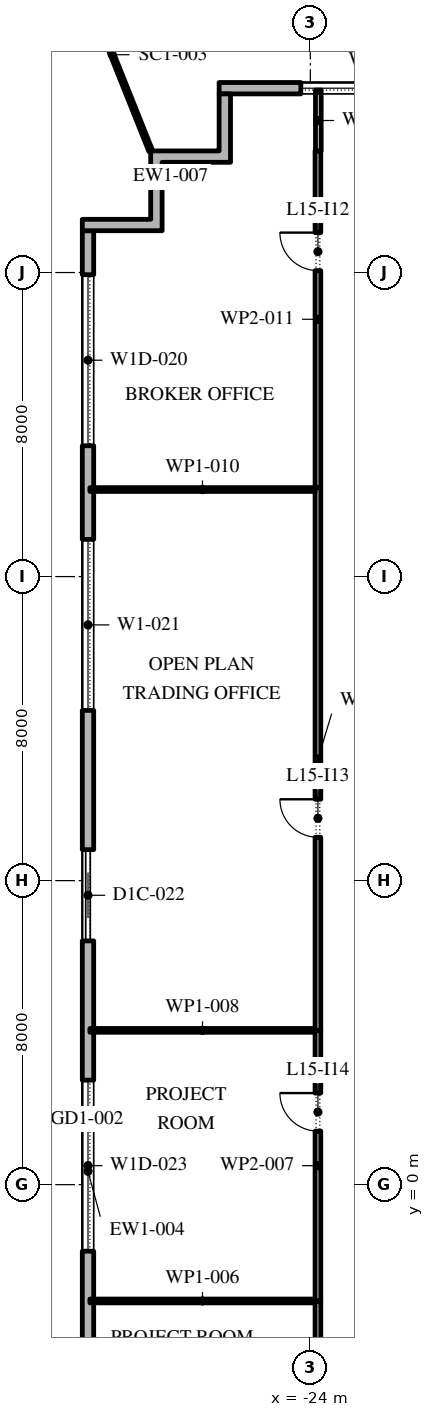
"""IFC4 building model, lengths in metres.
Left out: names, types, materials, properties, quantities, classifications, styles, units other than length and angle.
Written with IfcOpenShell. Run it as: python <this file> out.ifc"""

import sys

from ifc_helpers import new_model, si_unit, direction, frame, frame_2d, origin, place, context, subcontext, project, spatial, polyline, rectangle, outline, extrude, element, fill, save


model = new_model("IFC4")
c1 = context("Model", 3, precision=1e-05, world=origin(), true_north=direction((0.0, 1.0)))
c2 = subcontext(c1, "Body", "Model", "MODEL_VIEW")
j1 = project(units=[si_unit("LENGTHUNIT", "METRE"), si_unit("PLANEANGLEUNIT", "RADIAN")], contexts=[c1])
p1 = place(None, origin())
s1 = spatial("IfcSite", under=j1, at=p1, CompositionType="ELEMENT")
p2 = place(p1, origin())
s2 = spatial("IfcBuilding", under=s1, at=p2, CompositionType="ELEMENT")
p3 = place(p2, frame((0.0, 0.0, 73.2)))
s3 = spatial("IfcBuildingStorey", under=s2, at=p3, CompositionType="ELEMENT", Elevation=73.2)
p4 = place(p3, frame((26.1, 28.85, 0.0), z_axis=(0.0, 0.0, 1.0), x_axis=(-1.0, 0.0, 0.0)))
e1 = element("IfcWall", 1, at=p4, inside=s3, PredefinedType="STANDARD", context=c2, shape_type="SweptSolid", body=[
    extrude(rectangle(XDim=52.5, YDim=0.3, at=frame_2d((26.25, 0.0))), origin(), (0.0, 0.0, 1.0), 4.0),
])
p5 = place(p4, frame((2.0, 0.0, 0.45)))
e2 = element("IfcOpeningElement", 2, at=p5, cuts=e1, PredefinedType="OPENING", context=c2, shape_type="SweptSolid", body=[
    extrude(rectangle(XDim=4.5, YDim=2.95, at=frame_2d((2.25, 1.475))), frame((0.0, 0.16, 0.0), z_axis=(0.0, -1.0, 0.0), x_axis=(1.0, 0.0, 0.0)), (0.0, 0.0, 1.0), 0.32),
])
p6 = place(p4, frame((10.65, 0.0, 0.45)))
e3 = element("IfcOpeningElement", 3, at=p6, cuts=e1, PredefinedType="OPENING", context=c2, shape_type="SweptSolid", body=[
    extrude(rectangle(XDim=4.5, YDim=2.95, at=frame_2d((2.25, 1.475))), frame((0.0, 0.16, 0.0), z_axis=(0.0, -1.0, 0.0), x_axis=(1.0, 0.0, 0.0)), (0.0, 0.0, 1.0), 0.32),
])
p7 = place(p4, frame((20.5, 0.0, 0.0)))
e4 = element("IfcOpeningElement", 4, at=p7, cuts=e1, PredefinedType="OPENING", context=c2, shape_type="SweptSolid", body=[
    extrude(rectangle(XDim=2.4, YDim=3.5, at=frame_2d((1.2, 1.75))), frame((0.0, 0.16, 0.0), z_axis=(0.0, -1.0, 0.0), x_axis=(1.0, 0.0, 0.0)), (0.0, 0.0, 1.0), 0.32),
])
p8 = place(p4, frame((28.25, 0.0, 0.45)))
e5 = element("IfcOpeningElement", 5, at=p8, cuts=e1, PredefinedType="OPENING", context=c2, shape_type="SweptSolid", body=[
    extrude(rectangle(XDim=4.5, YDim=2.95, at=frame_2d((2.25, 1.475))), frame((0.0, 0.16, 0.0), z_axis=(0.0, -1.0, 0.0), x_axis=(1.0, 0.0, 0.0)), (0.0, 0.0, 1.0), 0.32),
])
p9 = place(p4, frame((37.05, 0.0, 0.45)))
e6 = element("IfcOpeningElement", 6, at=p9, cuts=e1, PredefinedType="OPENING", context=c2, shape_type="SweptSolid", body=[
    extrude(rectangle(XDim=4.5, YDim=2.95, at=frame_2d((2.25, 1.475))), frame((0.0, 0.16, 0.0), z_axis=(0.0, -1.0, 0.0), x_axis=(1.0, 0.0, 0.0)), (0.0, 0.0, 1.0), 0.32),
])
p10 = place(p4, frame((45.85, 0.0, 0.45)))
e7 = element("IfcOpeningElement", 7, at=p10, cuts=e1, PredefinedType="OPENING", context=c2, shape_type="SweptSolid", body=[
    extrude(rectangle(XDim=4.5, YDim=2.95, at=frame_2d((2.25, 1.475))), frame((0.0, 0.16, 0.0), z_axis=(0.0, -1.0, 0.0), x_axis=(1.0, 0.0, 0.0)), (0.0, 0.0, 1.0), 0.32),
])
p11 = place(p3, frame((-29.85, 25.1, 0.0), z_axis=(0.0, 0.0, 1.0), x_axis=(0.0, -1.0, 0.0)))
e8 = element("IfcWall", 8, at=p11, inside=s3, PredefinedType="STANDARD", context=c2, shape_type="SweptSolid", body=[
    extrude(rectangle(XDim=49.5, YDim=0.3, at=frame_2d((24.75, 0.0))), origin(), (0.0, 0.0, 1.0), 4.0),
])
p12 = place(p11, frame((1.157, 0.0, 0.45)))
e9 = element("IfcOpeningElement", 9, at=p12, cuts=e8, PredefinedType="OPENING", context=c2, shape_type="SweptSolid", body=[
    extrude(rectangle(XDim=4.5, YDim=2.875, at=frame_2d((2.25, 1.438))), frame((0.0, 0.16, 0.0), z_axis=(0.0, -1.0, 0.0), x_axis=(1.0, 0.0, 0.0)), (0.0, 0.0, 1.0), 0.32),
])
p13 = place(p11, frame((8.121, 0.0, 0.45)))
e10 = element("IfcOpeningElement", 10, at=p13, cuts=e8, PredefinedType="OPENING", context=c2, shape_type="SweptSolid", body=[
    extrude(rectangle(XDim=4.5, YDim=3.05, at=frame_2d((2.25, 1.525))), frame((0.0, 0.16, 0.0), z_axis=(0.0, -1.0, 0.0), x_axis=(1.0, 0.0, 0.0)), (0.0, 0.0, 1.0), 0.32),
])
p14 = place(p11, frame((16.286, 0.0, 0.0)))
e11 = element("IfcOpeningElement", 11, at=p14, cuts=e8, PredefinedType="OPENING", context=c2, shape_type="SweptSolid", body=[
    extrude(rectangle(XDim=2.4, YDim=3.325, at=frame_2d((1.2, 1.663))), frame((0.0, 0.16, 0.0), z_axis=(0.0, -1.0, 0.0), x_axis=(1.0, 0.0, 0.0)), (0.0, 0.0, 1.0), 0.32),
])
p15 = place(p11, frame((22.35, 0.0, 0.45)))
e12 = element("IfcOpeningElement", 12, at=p15, cuts=e8, PredefinedType="OPENING", context=c2, shape_type="SweptSolid", body=[
    extrude(rectangle(XDim=4.5, YDim=2.875, at=frame_2d((2.25, 1.438))), frame((0.0, 0.16, 0.0), z_axis=(0.0, -1.0, 0.0), x_axis=(1.0, 0.0, 0.0)), (0.0, 0.0, 1.0), 0.32),
])
p16 = place(p11, frame((29.464, 0.0, 0.45)))
e13 = element("IfcOpeningElement", 13, at=p16, cuts=e8, PredefinedType="OPENING", context=c2, shape_type="SweptSolid", body=[
    extrude(rectangle(XDim=4.5, YDim=2.875, at=frame_2d((2.25, 1.438))), frame((0.0, 0.16, 0.0), z_axis=(0.0, -1.0, 0.0), x_axis=(1.0, 0.0, 0.0)), (0.0, 0.0, 1.0), 0.32),
])
p17 = place(p11, frame((36.579, 0.0, 0.45)))
e14 = element("IfcOpeningElement", 14, at=p17, cuts=e8, PredefinedType="OPENING", context=c2, shape_type="SweptSolid", body=[
    extrude(rectangle(XDim=4.5, YDim=2.825, at=frame_2d((2.25, 1.413))), frame((0.0, 0.16, 0.0), z_axis=(0.0, -1.0, 0.0), x_axis=(1.0, 0.0, 0.0)), (0.0, 0.0, 1.0), 0.32),
])
p18 = place(p11, frame((44.743, 0.0, 0.0)))
e15 = element("IfcOpeningElement", 15, at=p18, cuts=e8, PredefinedType="OPENING", context=c2, shape_type="SweptSolid", body=[
    extrude(rectangle(XDim=2.4, YDim=3.5, at=frame_2d((1.2, 1.75))), frame((0.0, 0.16, 0.0), z_axis=(0.0, -1.0, 0.0), x_axis=(1.0, 0.0, 0.0)), (0.0, 0.0, 1.0), 0.32),
])
p19 = place(p3, origin())
e16 = element("IfcWall", 16, at=p19, inside=s3, PredefinedType="STANDARD", context=c2, shape_type="SweptSolid", body=[
    extrude(outline(polyline([(-28.2, 25.4), (-28.2, 27.2), (-26.4, 27.2), (-26.4, 28.7), (-26.1, 28.7), (-26.1, 26.9), (-27.9, 26.9), (-27.9, 25.1), (-30.0, 25.1), (-30.0, 25.4), (-28.2, 25.4)])), origin(), (0.0, 0.0, 1.0), 4.0),
])
p20 = place(p3, frame((-28.2, 27.2, -0.05), z_axis=(0.0, 0.0, 1.0), x_axis=(-0.371390676354, 0.928476690885, 0.0)))
e17 = element("IfcWall", 17, at=p20, inside=s3, PredefinedType="STANDARD", context=c2, shape_type="SweptSolid", body=[
    extrude(rectangle(XDim=5.452, YDim=0.1, at=frame_2d((2.726, 0.0))), origin(), (0.0, 0.0, 1.0), 4.05),
])
p21 = place(p3, frame((-23.8, -10.12, 0.0), z_axis=(0.0, 0.0, 1.0), x_axis=(0.0, 1.0, 0.0)))
e18 = element("IfcWall", 18, at=p21, inside=s3, PredefinedType="PARTITIONING", context=c2, shape_type="SweptSolid", body=[
    extrude(rectangle(XDim=7.06, YDim=0.15, at=frame_2d((3.53, 0.0))), origin(), (0.0, 0.0, 1.0), 4.0),
])
p22 = place(p21, frame((1.66, 0.0, 0.0)))
e19 = element("IfcOpeningElement", 19, at=p22, cuts=e18, PredefinedType="OPENING", context=c2, shape_type="SweptSolid", body=[
    extrude(rectangle(XDim=1.0, YDim=2.1, at=frame_2d((0.5, 1.05))), frame((0.0, 0.085, 0.0), z_axis=(0.0, -1.0, 0.0), x_axis=(1.0, 0.0, 0.0)), (0.0, 0.0, 1.0), 0.17),
])
p23 = place(p3, frame((-23.875, -3.06, 0.0), z_axis=(0.0, 0.0, 1.0), x_axis=(-1.0, 0.0, 0.0)))
e20 = element("IfcWall", 20, at=p23, inside=s3, PredefinedType="PARTITIONING", context=c2, shape_type="SweptSolid", body=[
    extrude(rectangle(XDim=5.925, YDim=0.1, at=frame_2d((2.962, 0.0))), origin(), (0.0, 0.0, 1.0), 4.0),
])
p24 = place(p3, frame((-23.8, -3.06, 0.0), z_axis=(0.0, 0.0, 1.0), x_axis=(0.0, 1.0, 0.0)))
e21 = element("IfcWall", 21, at=p24, inside=s3, PredefinedType="PARTITIONING", context=c2, shape_type="SweptSolid", body=[
    extrude(rectangle(XDim=7.12, YDim=0.15, at=frame_2d((3.56, 0.0))), origin(), (0.0, 0.0, 1.0), 4.0),
])
p25 = place(p24, frame((4.47, 0.0, 0.0)))
e22 = element("IfcOpeningElement", 22, at=p25, cuts=e21, PredefinedType="OPENING", context=c2, shape_type="SweptSolid", body=[
    extrude(rectangle(XDim=1.0, YDim=2.1, at=frame_2d((0.5, 1.05))), frame((0.0, 0.085, 0.0), z_axis=(0.0, -1.0, 0.0), x_axis=(1.0, 0.0, 0.0)), (0.0, 0.0, 1.0), 0.17),
])
p26 = place(p3, frame((-23.875, 4.06, 0.0), z_axis=(0.0, 0.0, 1.0), x_axis=(-1.0, 0.0, 0.0)))
e23 = element("IfcWall", 23, at=p26, inside=s3, PredefinedType="PARTITIONING", context=c2, shape_type="SweptSolid", body=[
    extrude(rectangle(XDim=5.925, YDim=0.1, at=frame_2d((2.962, 0.0))), origin(), (0.0, 0.0, 1.0), 4.0),
])
p27 = place(p3, frame((-23.8, 4.06, 0.0), z_axis=(0.0, 0.0, 1.0), x_axis=(0.0, 1.0, 0.0)))
e24 = element("IfcWall", 24, at=p27, inside=s3, PredefinedType="PARTITIONING", context=c2, shape_type="SweptSolid", body=[
    extrude(rectangle(XDim=14.28, YDim=0.15, at=frame_2d((7.14, 0.0))), origin(), (0.0, 0.0, 1.0), 4.0),
])
p28 = place(p27, frame((5.08, 0.0, 0.0)))
e25 = element("IfcOpeningElement", 25, at=p28, cuts=e24, PredefinedType="OPENING", context=c2, shape_type="SweptSolid", body=[
    extrude(rectangle(XDim=1.0, YDim=2.1, at=frame_2d((0.5, 1.05))), frame((0.0, 0.085, 0.0), z_axis=(0.0, -1.0, 0.0), x_axis=(1.0, 0.0, 0.0)), (0.0, 0.0, 1.0), 0.17),
])
p29 = place(p3, frame((-23.875, 18.29, 0.0), z_axis=(0.0, 0.0, 1.0), x_axis=(-1.0, 0.0, 0.0)))
e26 = element("IfcWall", 26, at=p29, inside=s3, PredefinedType="PARTITIONING", context=c2, shape_type="SweptSolid", body=[
    extrude(rectangle(XDim=5.925, YDim=0.1, at=frame_2d((2.962, 0.0))), origin(), (0.0, 0.0, 1.0), 4.0),
])
p30 = place(p3, frame((-23.8, 18.34, 0.0), z_axis=(0.0, 0.0, 1.0), x_axis=(0.0, 1.0, 0.0)))
e27 = element("IfcWall", 27, at=p30, inside=s3, PredefinedType="PARTITIONING", context=c2, shape_type="SweptSolid", body=[
    extrude(rectangle(XDim=8.86, YDim=0.15, at=frame_2d((4.43, 0.0))), origin(), (0.0, 0.0, 1.0), 4.0),
])
p31 = place(p30, frame((5.71, 0.0, 0.0)))
e28 = element("IfcOpeningElement", 28, at=p31, cuts=e27, PredefinedType="OPENING", context=c2, shape_type="SweptSolid", body=[
    extrude(rectangle(XDim=1.0, YDim=2.1, at=frame_2d((0.5, 1.05))), frame((0.0, 0.085, 0.0), z_axis=(0.0, -1.0, 0.0), x_axis=(1.0, 0.0, 0.0)), (0.0, 0.0, 1.0), 0.17),
])
p32 = place(p3, frame((-23.79, 27.2, 0.0), z_axis=(0.0, 0.0, 1.0), x_axis=(0.0, 1.0, 0.0)))
e29 = element("IfcWall", 29, at=p32, inside=s3, PredefinedType="PARTITIONING", context=c2, shape_type="SweptSolid", body=[
    extrude(rectangle(XDim=1.6, YDim=0.15, at=frame_2d((0.8, 0.0))), origin(), (0.0, 0.0, 1.0), 4.0),
])
p33 = place(p10, origin())
e30 = element("IfcWindow", 30, at=p33, inside=s3, PartitioningType="DOUBLE_PANEL_VERTICAL", PredefinedType="WINDOW", context=c2, shape_type="SweptSolid", body=[
    extrude(rectangle(XDim=4.5, YDim=2.95, at=frame_2d((2.25, 1.475))), frame((0.0, 0.03, 0.0), z_axis=(0.0, -1.0, 0.0), x_axis=(1.0, 0.0, 0.0)), (0.0, 0.0, 1.0), 0.06),
])
fill(e7, e30)
p34 = place(p12, origin())
e31 = element("IfcWindow", 31, at=p34, inside=s3, PartitioningType="DOUBLE_PANEL_VERTICAL", PredefinedType="WINDOW", context=c2, shape_type="SweptSolid", body=[
    extrude(rectangle(XDim=4.5, YDim=2.875, at=frame_2d((2.25, 1.438))), frame((0.0, 0.03, 0.0), z_axis=(0.0, -1.0, 0.0), x_axis=(1.0, 0.0, 0.0)), (0.0, 0.0, 1.0), 0.06),
])
fill(e9, e31)
p35 = place(p13, origin())
e32 = element("IfcWindow", 32, at=p35, inside=s3, PartitioningType="DOUBLE_PANEL_VERTICAL", PredefinedType="WINDOW", context=c2, shape_type="SweptSolid", body=[
    extrude(rectangle(XDim=4.5, YDim=3.05, at=frame_2d((2.25, 1.525))), frame((0.0, 0.03, 0.0), z_axis=(0.0, -1.0, 0.0), x_axis=(1.0, 0.0, 0.0)), (0.0, 0.0, 1.0), 0.06),
])
fill(e10, e32)
p36 = place(p14, origin())
e33 = element("IfcDoor", 33, at=p36, inside=s3, OperationType="DOUBLE_DOOR_SLIDING", PredefinedType="DOOR", context=c2, shape_type="SweptSolid", body=[
    extrude(rectangle(XDim=2.4, YDim=3.325, at=frame_2d((1.2, 1.663))), frame((0.0, 0.025, 0.0), z_axis=(0.0, -1.0, 0.0), x_axis=(1.0, 0.0, 0.0)), (0.0, 0.0, 1.0), 0.05),
])
fill(e11, e33)
p37 = place(p15, origin())
e34 = element("IfcWindow", 34, at=p37, inside=s3, PartitioningType="DOUBLE_PANEL_VERTICAL", PredefinedType="WINDOW", context=c2, shape_type="SweptSolid", body=[
    extrude(rectangle(XDim=4.5, YDim=2.875, at=frame_2d((2.25, 1.438))), frame((0.0, 0.03, 0.0), z_axis=(0.0, -1.0, 0.0), x_axis=(1.0, 0.0, 0.0)), (0.0, 0.0, 1.0), 0.06),
])
fill(e12, e34)
p38 = place(p31, origin())
e35 = element("IfcDoor", 35, at=p38, inside=s3, OperationType="SINGLE_SWING_LEFT", PredefinedType="DOOR", context=c2, shape_type="SweptSolid", body=[
    extrude(rectangle(XDim=1.0, YDim=2.1, at=frame_2d((0.5, 1.05))), frame((0.0, 0.025, 0.0), z_axis=(0.0, -1.0, 0.0), x_axis=(1.0, 0.0, 0.0)), (0.0, 0.0, 1.0), 0.05),
])
fill(e28, e35)
p39 = place(p28, origin())
e36 = element("IfcDoor", 36, at=p39, inside=s3, OperationType="SINGLE_SWING_LEFT", PredefinedType="DOOR", context=c2, shape_type="SweptSolid", body=[
    extrude(rectangle(XDim=1.0, YDim=2.1, at=frame_2d((0.5, 1.05))), frame((0.0, 0.025, 0.0), z_axis=(0.0, -1.0, 0.0), x_axis=(1.0, 0.0, 0.0)), (0.0, 0.0, 1.0), 0.05),
])
fill(e25, e36)
p40 = place(p25, origin())
e37 = element("IfcDoor", 37, at=p40, inside=s3, OperationType="SINGLE_SWING_LEFT", PredefinedType="DOOR", context=c2, shape_type="SweptSolid", body=[
    extrude(rectangle(XDim=1.0, YDim=2.1, at=frame_2d((0.5, 1.05))), frame((0.0, 0.025, 0.0), z_axis=(0.0, -1.0, 0.0), x_axis=(1.0, 0.0, 0.0)), (0.0, 0.0, 1.0), 0.05),
])
fill(e22, e37)
save(model, sys.argv[1])
